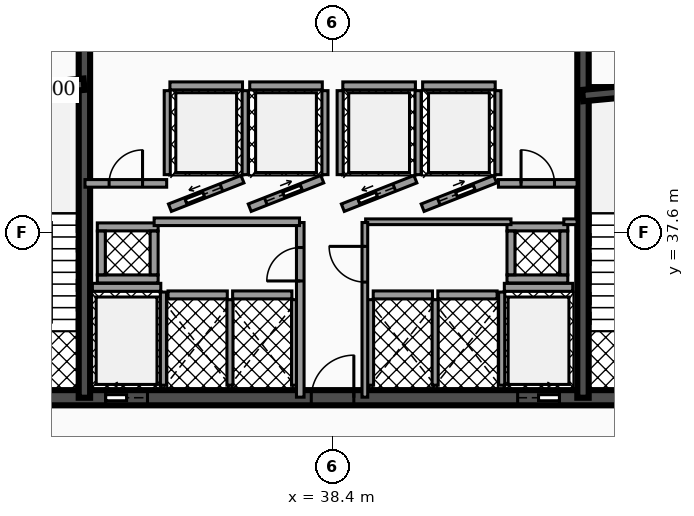
"""IFC4 building model, lengths in metres.
Left out: names, types, materials, properties, quantities, classifications, styles, units other than length and angle.
Written with IfcOpenShell. Run it as: python <this file> out.ifc"""

import sys

from ifc_helpers import new_model, si_unit, direction, frame, frame_2d, origin, place, context, subcontext, project, spatial, rectangle, extrude, element, fill, save


model = new_model("IFC4")
c1 = context("Model", 3, precision=1e-05, world=origin(), true_north=direction((0.0, 1.0)))
c2 = subcontext(c1, "Body", "Model", "MODEL_VIEW")
j1 = project(units=[si_unit("LENGTHUNIT", "METRE"), si_unit("PLANEANGLEUNIT", "RADIAN")], contexts=[c1])
p1 = place(None, origin())
s1 = spatial("IfcSite", under=j1, at=p1, CompositionType="ELEMENT")
p2 = place(p1, origin())
s2 = spatial("IfcBuilding", under=s1, at=p2, CompositionType="ELEMENT")
p3 = place(p2, frame((0.0, 0.0, 27.54)))
s3 = spatial("IfcBuildingStorey", under=s2, at=p3, CompositionType="ELEMENT", Elevation=27.54)
p4 = place(p3, frame((28.4, 33.25, 0.0), z_axis=(0.0, 0.0, 1.0), x_axis=(1.0, 0.0, 0.0)))
e1 = element("IfcWall", 1, at=p4, inside=s3, PredefinedType="SHEAR", context=c2, shape_type="SweptSolid", body=[
    extrude(rectangle(XDim=20.06, YDim=0.4, at=frame_2d((10.03, 0.0))), origin(), (0.0, 0.0, 1.0), 3.82),
])
p5 = place(p4, frame((4.03, 0.0, 0.0)))
e2 = element("IfcOpeningElement", 2, at=p5, cuts=e1, PredefinedType="OPENING", context=c2, shape_type="SweptSolid", body=[
    extrude(rectangle(XDim=1.1, YDim=2.15, at=frame_2d((0.55, 1.075))), frame((0.0, 0.21, 0.0), z_axis=(0.0, -1.0, 0.0), x_axis=(1.0, 0.0, 0.0)), (0.0, 0.0, 1.0), 0.42),
])
p6 = place(p4, frame((14.87, 0.0, 0.0)))
e3 = element("IfcOpeningElement", 3, at=p6, cuts=e1, PredefinedType="OPENING", context=c2, shape_type="SweptSolid", body=[
    extrude(rectangle(XDim=1.1, YDim=2.15, at=frame_2d((0.55, 1.075))), frame((0.0, 0.21, 0.0), z_axis=(0.0, -1.0, 0.0), x_axis=(1.0, 0.0, 0.0)), (0.0, 0.0, 1.0), 0.42),
])
p7 = place(p4, frame((1.31, 0.0, 0.0)))
e4 = element("IfcOpeningElement", 4, at=p7, cuts=e1, PredefinedType="OPENING", context=c2, shape_type="SweptSolid", body=[
    extrude(rectangle(XDim=1.1, YDim=2.2, at=frame_2d((0.55, 1.1))), frame((0.0, 0.21, 0.0), z_axis=(0.0, -1.0, 0.0), x_axis=(1.0, 0.0, 0.0)), (0.0, 0.0, 1.0), 0.42),
])
p8 = place(p4, frame((9.44, 0.0, 0.0)))
e5 = element("IfcOpeningElement", 5, at=p8, cuts=e1, PredefinedType="OPENING", context=c2, shape_type="SweptSolid", body=[
    extrude(rectangle(XDim=1.12, YDim=2.05, at=frame_2d((0.56, 1.025))), frame((0.0, 0.21, 0.0), z_axis=(0.0, -1.0, 0.0), x_axis=(1.0, 0.0, 0.0)), (0.0, 0.0, 1.0), 0.42),
])
p9 = place(p4, frame((17.65, 0.0, 0.0)))
e6 = element("IfcOpeningElement", 6, at=p9, cuts=e1, PredefinedType="OPENING", context=c2, shape_type="SweptSolid", body=[
    extrude(rectangle(XDim=1.1, YDim=2.2, at=frame_2d((0.55, 1.1))), frame((0.0, 0.21, 0.0), z_axis=(0.0, -1.0, 0.0), x_axis=(1.0, 0.0, 0.0)), (0.0, 0.0, 1.0), 0.42),
])
for number, where, z_axis, x_axis in (
    (7, (31.87, 33.25, 0.0), (0.0, 0.0, 1.0), (0.0, 1.0, 0.0)),
    (8, (44.99, 33.25, 0.0), (0.0, 0.0, 1.0), (0.0, 1.0, 0.0)),
):
    element("IfcWall", number, at=place(p3, frame(where, z_axis=z_axis, x_axis=x_axis)), inside=s3, PredefinedType="SHEAR", context=c2, shape_type="SweptSolid", body=[
        extrude(rectangle(XDim=10.2, YDim=0.3, at=frame_2d((5.1, 0.0))), origin(), (0.0, 0.0, 1.0), 3.82),
    ])
p10 = place(p3, frame((28.64, 41.2, 0.0), z_axis=(0.0, 0.0, 1.0), x_axis=(0.995687118776, 0.092774789157, 0.0)))
e9 = element("IfcWall", 9, at=p10, inside=s3, PredefinedType="SHEAR", context=c2, shape_type="SweptSolid", body=[
    extrude(rectangle(XDim=3.234, YDim=0.3, at=frame_2d((1.617, 0.0))), origin(), (0.0, 0.0, 1.0), 3.82),
])
p11 = place(p3, frame((44.98, 41.2, 0.0), z_axis=(0.0, 0.0, 1.0), x_axis=(0.995686468965, 0.09278176286, 0.0)))
e10 = element("IfcWall", 10, at=p11, inside=s3, PredefinedType="SHEAR", context=c2, shape_type="SweptSolid", body=[
    extrude(rectangle(XDim=3.234, YDim=0.3, at=frame_2d((1.617, 0.0))), origin(), (0.0, 0.0, 1.0), 3.82),
])
p12 = place(p3, frame((32.08, 36.155, 0.0), z_axis=(0.0, 0.0, 1.0), x_axis=(1.0, 0.0, 0.0)))
e11 = element("IfcWall", 11, at=p12, inside=s3, PredefinedType="SOLIDWALL", context=c2, shape_type="SweptSolid", body=[
    extrude(rectangle(XDim=1.8, YDim=0.21, at=frame_2d((0.9, 0.0))), origin(), (0.0, 0.0, 1.0), 2.792),
])
p13 = place(p3, frame((33.95, 33.58, 0.0), z_axis=(0.0, 0.0, 1.0), x_axis=(0.0, 1.0, 0.0)))
e12 = element("IfcWall", 12, at=p13, inside=s3, PredefinedType="SOLIDWALL", context=c2, shape_type="SweptSolid", body=[
    extrude(rectangle(XDim=2.45, YDim=0.16, at=frame_2d((1.225, 0.0))), origin(), (0.0, 0.0, 1.0), 2.792),
])
p14 = place(p3, frame((42.92, 36.155, 0.0), z_axis=(0.0, 0.0, 1.0), x_axis=(1.0, 0.0, 0.0)))
e13 = element("IfcWall", 13, at=p14, inside=s3, PredefinedType="SOLIDWALL", context=c2, shape_type="SweptSolid", body=[
    extrude(rectangle(XDim=1.8, YDim=0.21, at=frame_2d((0.9, 0.0))), origin(), (0.0, 0.0, 1.0), 2.792),
])
p15 = place(p3, frame((42.85, 33.58, 0.0), z_axis=(0.0, 0.0, 1.0), x_axis=(0.0, 1.0, 0.0)))
e14 = element("IfcWall", 14, at=p15, inside=s3, PredefinedType="SOLIDWALL", context=c2, shape_type="SweptSolid", body=[
    extrude(rectangle(XDim=2.45, YDim=0.16, at=frame_2d((1.225, 0.0))), origin(), (0.0, 0.0, 1.0), 2.792),
])
p16 = place(p3, frame((34.12, 38.25, 0.0), z_axis=(0.0, 0.0, 1.0), x_axis=(0.930804993012, 0.36551616241, 0.0)))
e15 = element("IfcWall", 15, at=p16, inside=s3, PredefinedType="SOLIDWALL", context=c2, shape_type="SweptSolid", body=[
    extrude(rectangle(XDim=2.052, YDim=0.21, at=frame_2d((1.026, 0.0))), origin(), (0.0, 0.0, 1.0), 2.792),
])
p17 = place(p16, frame((0.455, 0.0, 0.0)))
e16 = element("IfcOpeningElement", 16, at=p17, cuts=e15, PredefinedType="OPENING", context=c2, shape_type="SweptSolid", body=[
    extrude(rectangle(XDim=1.0, YDim=2.1, at=frame_2d((0.5, 1.05))), frame((0.0, 0.115, 0.0), z_axis=(0.0, -1.0, 0.0), x_axis=(1.0, 0.0, 0.0)), (0.0, 0.0, 1.0), 0.23),
])
p18 = place(p3, frame((34.12, 41.455, 0.0), z_axis=(0.0, 0.0, 1.0), x_axis=(1.0, 0.0, 0.0)))
e17 = element("IfcWall", 17, at=p18, inside=s3, PredefinedType="SOLIDWALL", context=c2, shape_type="SweptSolid", body=[
    extrude(rectangle(XDim=1.91, YDim=0.21, at=frame_2d((0.955, 0.0))), origin(), (0.0, 0.0, 1.0), 2.792),
])
for number, where, z_axis, x_axis in (
    (18, (34.05, 39.12, 0.0), (0.0, 0.0, 1.0), (0.0, 1.0, 0.0)),
    (19, (36.1, 39.12, 0.0), (0.0, 0.0, 1.0), (0.0, 1.0, 0.0)),
):
    element("IfcWall", number, at=place(p3, frame(where, z_axis=z_axis, x_axis=x_axis)), inside=s3, PredefinedType="SOLIDWALL", context=c2, shape_type="SweptSolid", body=[
        extrude(rectangle(XDim=2.21, YDim=0.16, at=frame_2d((1.105, 0.0))), origin(), (0.0, 0.0, 1.0), 2.792),
    ])
p19 = place(p3, frame((36.22, 38.25, 0.0), z_axis=(0.0, 0.0, 1.0), x_axis=(0.930804993012, 0.36551616241, 0.0)))
e20 = element("IfcWall", 20, at=p19, inside=s3, PredefinedType="SOLIDWALL", context=c2, shape_type="SweptSolid", body=[
    extrude(rectangle(XDim=2.052, YDim=0.21, at=frame_2d((1.026, 0.0))), origin(), (0.0, 0.0, 1.0), 2.792),
])
p20 = place(p19, frame((0.455, 0.0, 0.0)))
e21 = element("IfcOpeningElement", 21, at=p20, cuts=e20, PredefinedType="OPENING", context=c2, shape_type="SweptSolid", body=[
    extrude(rectangle(XDim=1.0, YDim=2.1, at=frame_2d((0.5, 1.05))), frame((0.0, 0.115, 0.0), z_axis=(0.0, -1.0, 0.0), x_axis=(1.0, 0.0, 0.0)), (0.0, 0.0, 1.0), 0.23),
])
p21 = place(p3, frame((36.22, 41.455, 0.0), z_axis=(0.0, 0.0, 1.0), x_axis=(1.0, 0.0, 0.0)))
e22 = element("IfcWall", 22, at=p21, inside=s3, PredefinedType="SOLIDWALL", context=c2, shape_type="SweptSolid", body=[
    extrude(rectangle(XDim=1.91, YDim=0.21, at=frame_2d((0.955, 0.0))), origin(), (0.0, 0.0, 1.0), 2.792),
])
p22 = place(p3, frame((38.2, 39.12, 0.0), z_axis=(0.0, 0.0, 1.0), x_axis=(0.0, 1.0, 0.0)))
e23 = element("IfcWall", 23, at=p22, inside=s3, PredefinedType="SOLIDWALL", context=c2, shape_type="SweptSolid", body=[
    extrude(rectangle(XDim=2.21, YDim=0.16, at=frame_2d((1.105, 0.0))), origin(), (0.0, 0.0, 1.0), 2.792),
])
p23 = place(p3, frame((38.67, 38.25, 0.0), z_axis=(0.0, 0.0, 1.0), x_axis=(0.930820886763, 0.3654756856, 0.0)))
e24 = element("IfcWall", 24, at=p23, inside=s3, PredefinedType="SOLIDWALL", context=c2, shape_type="SweptSolid", body=[
    extrude(rectangle(XDim=2.052, YDim=0.21, at=frame_2d((1.026, 0.0))), origin(), (0.0, 0.0, 1.0), 2.792),
])
p24 = place(p23, frame((0.455, 0.0, 0.0)))
e25 = element("IfcOpeningElement", 25, at=p24, cuts=e24, PredefinedType="OPENING", context=c2, shape_type="SweptSolid", body=[
    extrude(rectangle(XDim=1.0, YDim=2.1, at=frame_2d((0.5, 1.05))), frame((0.0, 0.115, 0.0), z_axis=(0.0, -1.0, 0.0), x_axis=(1.0, 0.0, 0.0)), (0.0, 0.0, 1.0), 0.23),
])
p25 = place(p3, frame((38.67, 41.455, 0.0), z_axis=(0.0, 0.0, 1.0), x_axis=(1.0, 0.0, 0.0)))
e26 = element("IfcWall", 26, at=p25, inside=s3, PredefinedType="SOLIDWALL", context=c2, shape_type="SweptSolid", body=[
    extrude(rectangle(XDim=1.91, YDim=0.21, at=frame_2d((0.955, 0.0))), origin(), (0.0, 0.0, 1.0), 2.792),
])
for number, where, z_axis, x_axis in (
    (27, (38.6, 39.12, 0.0), (0.0, 0.0, 1.0), (0.0, 1.0, 0.0)),
    (28, (40.65, 39.12, 0.0), (0.0, 0.0, 1.0), (0.0, 1.0, 0.0)),
):
    element("IfcWall", number, at=place(p3, frame(where, z_axis=z_axis, x_axis=x_axis)), inside=s3, PredefinedType="SOLIDWALL", context=c2, shape_type="SweptSolid", body=[
        extrude(rectangle(XDim=2.21, YDim=0.16, at=frame_2d((1.105, 0.0))), origin(), (0.0, 0.0, 1.0), 2.792),
    ])
p26 = place(p3, frame((40.77, 38.25, 0.0), z_axis=(0.0, 0.0, 1.0), x_axis=(0.930804993012, 0.36551616241, 0.0)))
e29 = element("IfcWall", 29, at=p26, inside=s3, PredefinedType="SOLIDWALL", context=c2, shape_type="SweptSolid", body=[
    extrude(rectangle(XDim=2.052, YDim=0.21, at=frame_2d((1.026, 0.0))), origin(), (0.0, 0.0, 1.0), 2.792),
])
p27 = place(p26, frame((0.455, 0.0, 0.0)))
e30 = element("IfcOpeningElement", 30, at=p27, cuts=e29, PredefinedType="OPENING", context=c2, shape_type="SweptSolid", body=[
    extrude(rectangle(XDim=1.0, YDim=2.1, at=frame_2d((0.5, 1.05))), frame((0.0, 0.115, 0.0), z_axis=(0.0, -1.0, 0.0), x_axis=(1.0, 0.0, 0.0)), (0.0, 0.0, 1.0), 0.23),
])
p28 = place(p3, frame((40.77, 41.455, 0.0), z_axis=(0.0, 0.0, 1.0), x_axis=(1.0, 0.0, 0.0)))
e31 = element("IfcWall", 31, at=p28, inside=s3, PredefinedType="SOLIDWALL", context=c2, shape_type="SweptSolid", body=[
    extrude(rectangle(XDim=1.91, YDim=0.21, at=frame_2d((0.955, 0.0))), origin(), (0.0, 0.0, 1.0), 2.792),
])
p29 = place(p3, frame((42.75, 39.12, 0.0), z_axis=(0.0, 0.0, 1.0), x_axis=(0.0, 1.0, 0.0)))
e32 = element("IfcWall", 32, at=p29, inside=s3, PredefinedType="SOLIDWALL", context=c2, shape_type="SweptSolid", body=[
    extrude(rectangle(XDim=2.21, YDim=0.16, at=frame_2d((1.105, 0.0))), origin(), (0.0, 0.0, 1.0), 2.792),
])
p30 = place(p3, frame((34.07, 35.955, 0.0), z_axis=(0.0, 0.0, 1.0), x_axis=(1.0, 0.0, 0.0)))
e33 = element("IfcWall", 33, at=p30, inside=s3, PredefinedType="SOLIDWALL", context=c2, shape_type="SweptSolid", body=[
    extrude(rectangle(XDim=1.56, YDim=0.21, at=frame_2d((0.78, 0.0))), origin(), (0.0, 0.0, 1.0), 2.792),
])
p31 = place(p3, frame((35.7, 33.58, 0.0), z_axis=(0.0, 0.0, 1.0), x_axis=(0.0, 1.0, 0.0)))
e34 = element("IfcWall", 34, at=p31, inside=s3, PredefinedType="SOLIDWALL", context=c2, shape_type="SweptSolid", body=[
    extrude(rectangle(XDim=2.25, YDim=0.16, at=frame_2d((1.125, 0.0))), origin(), (0.0, 0.0, 1.0), 2.792),
])
p32 = place(p3, frame((35.77, 35.955, 0.0), z_axis=(0.0, 0.0, 1.0), x_axis=(1.0, 0.0, 0.0)))
e35 = element("IfcWall", 35, at=p32, inside=s3, PredefinedType="SOLIDWALL", context=c2, shape_type="SweptSolid", body=[
    extrude(rectangle(XDim=1.56, YDim=0.21, at=frame_2d((0.78, 0.0))), origin(), (0.0, 0.0, 1.0), 2.792),
])
p33 = place(p3, frame((37.4, 33.58, 0.0), z_axis=(0.0, 0.0, 1.0), x_axis=(0.0, 1.0, 0.0)))
e36 = element("IfcWall", 36, at=p33, inside=s3, PredefinedType="SOLIDWALL", context=c2, shape_type="SweptSolid", body=[
    extrude(rectangle(XDim=2.25, YDim=0.16, at=frame_2d((1.125, 0.0))), origin(), (0.0, 0.0, 1.0), 2.792),
])
p34 = place(p3, frame((39.47, 35.955, 0.0), z_axis=(0.0, 0.0, 1.0), x_axis=(1.0, 0.0, 0.0)))
e37 = element("IfcWall", 37, at=p34, inside=s3, PredefinedType="SOLIDWALL", context=c2, shape_type="SweptSolid", body=[
    extrude(rectangle(XDim=1.56, YDim=0.21, at=frame_2d((0.78, 0.0))), origin(), (0.0, 0.0, 1.0), 2.792),
])
for number, where, z_axis, x_axis in (
    (38, (39.4, 33.58, 0.0), (0.0, 0.0, 1.0), (0.0, 1.0, 0.0)),
    (39, (41.1, 33.58, 0.0), (0.0, 0.0, 1.0), (0.0, 1.0, 0.0)),
):
    element("IfcWall", number, at=place(p3, frame(where, z_axis=z_axis, x_axis=x_axis)), inside=s3, PredefinedType="SOLIDWALL", context=c2, shape_type="SweptSolid", body=[
        extrude(rectangle(XDim=2.25, YDim=0.16, at=frame_2d((1.125, 0.0))), origin(), (0.0, 0.0, 1.0), 2.792),
    ])
p35 = place(p3, frame((41.17, 35.955, 0.0), z_axis=(0.0, 0.0, 1.0), x_axis=(1.0, 0.0, 0.0)))
e40 = element("IfcWall", 40, at=p35, inside=s3, PredefinedType="SOLIDWALL", context=c2, shape_type="SweptSolid", body=[
    extrude(rectangle(XDim=1.56, YDim=0.21, at=frame_2d((0.78, 0.0))), origin(), (0.0, 0.0, 1.0), 2.792),
])
for number, where, z_axis, x_axis in (
    (41, (32.21, 36.375, 0.0), (0.0, 0.0, 1.0), (1.0, 0.0, 0.0)),
    (42, (32.21, 37.745, 0.0), (0.0, 0.0, 1.0), (1.0, 0.0, 0.0)),
):
    element("IfcWall", number, at=place(p3, frame(where, z_axis=z_axis, x_axis=x_axis)), inside=s3, PredefinedType="SOLIDWALL", context=c2, shape_type="SweptSolid", body=[
        extrude(rectangle(XDim=1.6, YDim=0.21, at=frame_2d((0.8, 0.0))), origin(), (0.0, 0.0, 1.0), 3.82),
    ])
for number, where, z_axis, x_axis in (
    (43, (32.315, 36.485, 0.0), (0.0, 0.0, 1.0), (0.0, 1.0, 0.0)),
    (44, (33.705, 36.485, 0.0), (0.0, 0.0, 1.0), (0.0, 1.0, 0.0)),
):
    element("IfcWall", number, at=place(p3, frame(where, z_axis=z_axis, x_axis=x_axis)), inside=s3, PredefinedType="SOLIDWALL", context=c2, shape_type="SweptSolid", body=[
        extrude(rectangle(XDim=1.15, YDim=0.21, at=frame_2d((0.575, 0.0))), origin(), (0.0, 0.0, 1.0), 3.82),
    ])
for number, where, z_axis, x_axis in (
    (45, (42.99, 36.375, 0.0), (0.0, 0.0, 1.0), (1.0, 0.0, 0.0)),
    (46, (42.99, 37.745, 0.0), (0.0, 0.0, 1.0), (1.0, 0.0, 0.0)),
):
    element("IfcWall", number, at=place(p3, frame(where, z_axis=z_axis, x_axis=x_axis)), inside=s3, PredefinedType="SOLIDWALL", context=c2, shape_type="SweptSolid", body=[
        extrude(rectangle(XDim=1.6, YDim=0.21, at=frame_2d((0.8, 0.0))), origin(), (0.0, 0.0, 1.0), 3.82),
    ])
for number, where, z_axis, x_axis in (
    (47, (43.095, 36.485, 0.0), (0.0, 0.0, 1.0), (0.0, 1.0, 0.0)),
    (48, (44.485, 36.485, 0.0), (0.0, 0.0, 1.0), (0.0, 1.0, 0.0)),
):
    element("IfcWall", number, at=place(p3, frame(where, z_axis=z_axis, x_axis=x_axis)), inside=s3, PredefinedType="SOLIDWALL", context=c2, shape_type="SweptSolid", body=[
        extrude(rectangle(XDim=1.15, YDim=0.21, at=frame_2d((0.575, 0.0))), origin(), (0.0, 0.0, 1.0), 3.82),
    ])
p36 = place(p3, frame((37.55, 33.265, 0.0), z_axis=(0.0, 0.0, 1.0), x_axis=(0.0, 1.0, 0.0)))
e49 = element("IfcWall", 49, at=p36, inside=s3, PredefinedType="PARTITIONING", context=c2, shape_type="SweptSolid", body=[
    extrude(rectangle(XDim=4.595, YDim=0.2, at=frame_2d((2.298, 0.0))), origin(), (0.0, 0.0, 1.0), 2.777),
])
p37 = place(p36, frame((3.058, 0.0, 0.0)))
e50 = element("IfcOpeningElement", 50, at=p37, cuts=e49, PredefinedType="OPENING", context=c2, shape_type="SweptSolid", body=[
    extrude(rectangle(XDim=0.88, YDim=2.05, at=frame_2d((0.44, 1.025))), frame((0.0, 0.11, 0.0), z_axis=(0.0, -1.0, 0.0), x_axis=(1.0, 0.0, 0.0)), (0.0, 0.0, 1.0), 0.22),
])
p38 = place(p3, frame((33.705, 37.88, 0.0), z_axis=(0.0, 0.0, 1.0), x_axis=(1.0, 0.0, 0.0)))
e51 = element("IfcWall", 51, at=p38, inside=s3, PredefinedType="PARTITIONING", context=c2, shape_type="SweptSolid", body=[
    extrude(rectangle(XDim=3.825, YDim=0.2, at=frame_2d((1.913, 0.0))), origin(), (0.0, 0.0, 1.0), 2.777),
])
p39 = place(p3, frame((31.885, 38.89, 0.0), z_axis=(0.0, 0.0, 1.0), x_axis=(1.0, 0.0, 0.0)))
e52 = element("IfcWall", 52, at=p39, inside=s3, PredefinedType="PARTITIONING", context=c2, shape_type="SweptSolid", body=[
    extrude(rectangle(XDim=2.15, YDim=0.2, at=frame_2d((1.075, 0.0))), origin(), (0.0, 0.0, 1.0), 2.777),
])
p40 = place(p39, frame((0.635, 0.0, 0.0)))
e53 = element("IfcOpeningElement", 53, at=p40, cuts=e52, PredefinedType="OPENING", context=c2, shape_type="SweptSolid", body=[
    extrude(rectangle(XDim=0.88, YDim=2.05, at=frame_2d((0.44, 1.025))), frame((0.0, 0.11, 0.0), z_axis=(0.0, -1.0, 0.0), x_axis=(1.0, 0.0, 0.0)), (0.0, 0.0, 1.0), 0.22),
])
p41 = place(p3, frame((42.765, 38.89, 0.0), z_axis=(0.0, 0.0, 1.0), x_axis=(1.0, 0.0, 0.0)))
e54 = element("IfcWall", 54, at=p41, inside=s3, PredefinedType="PARTITIONING", context=c2, shape_type="SweptSolid", body=[
    extrude(rectangle(XDim=2.07, YDim=0.2, at=frame_2d((1.035, 0.0))), origin(), (0.0, 0.0, 1.0), 2.777),
])
p42 = place(p41, frame((0.595, 0.0, 0.0)))
e55 = element("IfcOpeningElement", 55, at=p42, cuts=e54, PredefinedType="OPENING", context=c2, shape_type="SweptSolid", body=[
    extrude(rectangle(XDim=0.88, YDim=2.05, at=frame_2d((0.44, 1.025))), frame((0.0, 0.11, 0.0), z_axis=(0.0, -1.0, 0.0), x_axis=(1.0, 0.0, 0.0)), (0.0, 0.0, 1.0), 0.22),
])
p43 = place(p3, frame((39.27, 37.88, 0.0), z_axis=(0.0, 0.0, 1.0), x_axis=(1.0, 0.0, 0.0)))
e56 = element("IfcWall", 56, at=p43, inside=s3, PredefinedType="PARTITIONING", context=c2, shape_type="SweptSolid", body=[
    extrude(rectangle(XDim=3.825, YDim=0.15, at=frame_2d((1.913, 0.0))), origin(), (0.0, 0.0, 1.0), 2.777),
])
p44 = place(p3, frame((44.485, 37.88, 0.0), z_axis=(0.0, 0.0, 1.0), x_axis=(1.0, 0.0, 0.0)))
e57 = element("IfcWall", 57, at=p44, inside=s3, PredefinedType="PARTITIONING", context=c2, shape_type="SweptSolid", body=[
    extrude(rectangle(XDim=0.35, YDim=0.15, at=frame_2d((0.175, 0.0))), origin(), (0.0, 0.0, 1.0), 2.777),
])
p45 = place(p3, frame((39.25, 33.265, 0.0), z_axis=(0.0, 0.0, 1.0), x_axis=(0.0, 1.0, 0.0)))
e58 = element("IfcWall", 58, at=p45, inside=s3, PredefinedType="PARTITIONING", context=c2, shape_type="SweptSolid", body=[
    extrude(rectangle(XDim=4.595, YDim=0.15, at=frame_2d((2.298, 0.0))), origin(), (0.0, 0.0, 1.0), 2.777),
])
p46 = place(p45, frame((3.028, 0.0, 0.0)))
e59 = element("IfcOpeningElement", 59, at=p46, cuts=e58, PredefinedType="OPENING", context=c2, shape_type="SweptSolid", body=[
    extrude(rectangle(XDim=0.94, YDim=2.05, at=frame_2d((0.47, 1.025))), frame((0.0, 0.085, 0.0), z_axis=(0.0, -1.0, 0.0), x_axis=(1.0, 0.0, 0.0)), (0.0, 0.0, 1.0), 0.17),
])
p47 = place(p5, origin())
e60 = element("IfcDoor", 60, at=p47, inside=s3, OperationType="SLIDING_TO_LEFT", PredefinedType="DOOR", context=c2, shape_type="SweptSolid", body=[
    extrude(rectangle(XDim=1.1, YDim=2.15, at=frame_2d((0.55, 1.075))), frame((0.0, 0.025, 0.0), z_axis=(0.0, -1.0, 0.0), x_axis=(1.0, 0.0, 0.0)), (0.0, 0.0, 1.0), 0.05),
])
fill(e2, e60)
p48 = place(p6, origin())
e61 = element("IfcDoor", 61, at=p48, inside=s3, OperationType="SLIDING_TO_RIGHT", PredefinedType="DOOR", context=c2, shape_type="SweptSolid", body=[
    extrude(rectangle(XDim=1.1, YDim=2.15, at=frame_2d((0.55, 1.075))), frame((0.0, 0.025, 0.0), z_axis=(0.0, -1.0, 0.0), x_axis=(1.0, 0.0, 0.0)), (0.0, 0.0, 1.0), 0.05),
])
fill(e3, e61)
p49 = place(p17, origin())
e62 = element("IfcDoor", 62, at=p49, inside=s3, OperationType="SLIDING_TO_LEFT", PredefinedType="DOOR", context=c2, shape_type="SweptSolid", body=[
    extrude(rectangle(XDim=1.0, YDim=2.1, at=frame_2d((0.5, 1.05))), frame((0.0, 0.025, 0.0), z_axis=(0.0, -1.0, 0.0), x_axis=(1.0, 0.0, 0.0)), (0.0, 0.0, 1.0), 0.05),
])
fill(e16, e62)
p50 = place(p20, origin())
e63 = element("IfcDoor", 63, at=p50, inside=s3, OperationType="SLIDING_TO_RIGHT", PredefinedType="DOOR", context=c2, shape_type="SweptSolid", body=[
    extrude(rectangle(XDim=1.0, YDim=2.1, at=frame_2d((0.5, 1.05))), frame((0.0, 0.025, 0.0), z_axis=(0.0, -1.0, 0.0), x_axis=(1.0, 0.0, 0.0)), (0.0, 0.0, 1.0), 0.05),
])
fill(e21, e63)
p51 = place(p24, origin())
e64 = element("IfcDoor", 64, at=p51, inside=s3, OperationType="SLIDING_TO_LEFT", PredefinedType="DOOR", context=c2, shape_type="SweptSolid", body=[
    extrude(rectangle(XDim=1.0, YDim=2.1, at=frame_2d((0.5, 1.05))), frame((0.0, 0.025, 0.0), z_axis=(0.0, -1.0, 0.0), x_axis=(1.0, 0.0, 0.0)), (0.0, 0.0, 1.0), 0.05),
])
fill(e25, e64)
p52 = place(p27, origin())
e65 = element("IfcDoor", 65, at=p52, inside=s3, OperationType="SLIDING_TO_RIGHT", PredefinedType="DOOR", context=c2, shape_type="SweptSolid", body=[
    extrude(rectangle(XDim=1.0, YDim=2.1, at=frame_2d((0.5, 1.05))), frame((0.0, 0.025, 0.0), z_axis=(0.0, -1.0, 0.0), x_axis=(1.0, 0.0, 0.0)), (0.0, 0.0, 1.0), 0.05),
])
fill(e30, e65)
p53 = place(p8, origin())
e66 = element("IfcDoor", 66, at=p53, inside=s3, OperationType="SINGLE_SWING_RIGHT", PredefinedType="DOOR", context=c2, shape_type="SweptSolid", body=[
    extrude(rectangle(XDim=1.12, YDim=2.05, at=frame_2d((0.56, 1.025))), frame((0.0, 0.025, 0.0), z_axis=(0.0, -1.0, 0.0), x_axis=(1.0, 0.0, 0.0)), (0.0, 0.0, 1.0), 0.05),
])
fill(e5, e66)
p54 = place(p37, origin())
e67 = element("IfcDoor", 67, at=p54, inside=s3, OperationType="SINGLE_SWING_LEFT", PredefinedType="DOOR", context=c2, shape_type="SweptSolid", body=[
    extrude(rectangle(XDim=0.88, YDim=2.05, at=frame_2d((0.44, 1.025))), frame((0.0, 0.025, 0.0), z_axis=(0.0, -1.0, 0.0), x_axis=(1.0, 0.0, 0.0)), (0.0, 0.0, 1.0), 0.05),
])
fill(e50, e67)
p55 = place(p40, origin())
e68 = element("IfcDoor", 68, at=p55, inside=s3, OperationType="SINGLE_SWING_RIGHT", PredefinedType="DOOR", context=c2, shape_type="SweptSolid", body=[
    extrude(rectangle(XDim=0.88, YDim=2.05, at=frame_2d((0.44, 1.025))), frame((0.0, 0.025, 0.0), z_axis=(0.0, -1.0, 0.0), x_axis=(1.0, 0.0, 0.0)), (0.0, 0.0, 1.0), 0.05),
])
fill(e53, e68)
p56 = place(p42, origin())
e69 = element("IfcDoor", 69, at=p56, inside=s3, OperationType="SINGLE_SWING_LEFT", PredefinedType="DOOR", context=c2, shape_type="SweptSolid", body=[
    extrude(rectangle(XDim=0.88, YDim=2.05, at=frame_2d((0.44, 1.025))), frame((0.0, 0.025, 0.0), z_axis=(0.0, -1.0, 0.0), x_axis=(1.0, 0.0, 0.0)), (0.0, 0.0, 1.0), 0.05),
])
fill(e55, e69)
p57 = place(p46, origin())
e70 = element("IfcDoor", 70, at=p57, inside=s3, OperationType="SINGLE_SWING_RIGHT", PredefinedType="DOOR", context=c2, shape_type="SweptSolid", body=[
    extrude(rectangle(XDim=0.94, YDim=2.05, at=frame_2d((0.47, 1.025))), frame((0.0, 0.025, 0.0), z_axis=(0.0, -1.0, 0.0), x_axis=(1.0, 0.0, 0.0)), (0.0, 0.0, 1.0), 0.05),
])
fill(e59, e70)
save(model, sys.argv[1])
